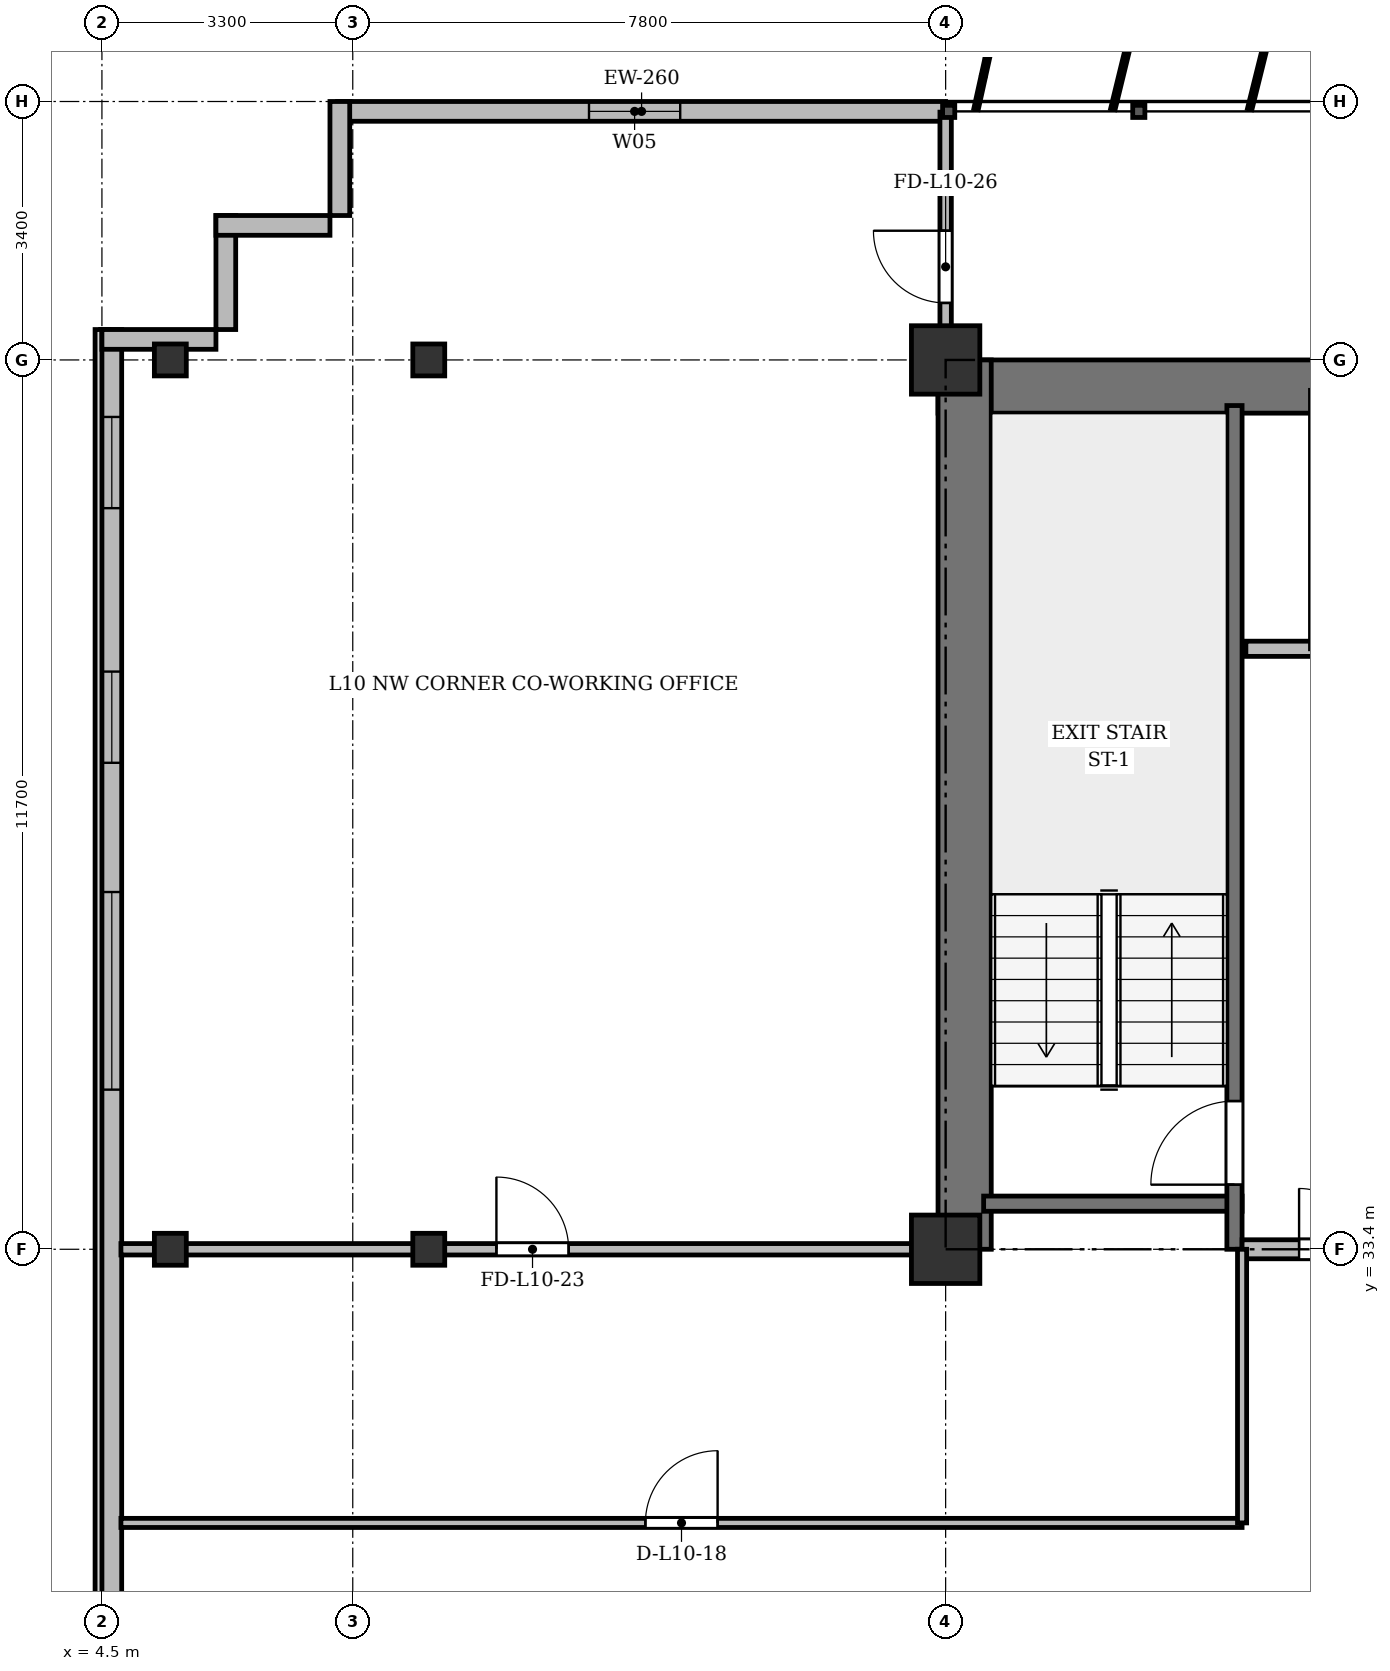
"""IFC4 building model, lengths in metres.
Left out: names, types, materials, properties, quantities, classifications, styles, units other than length and angle.
Written with IfcOpenShell. Run it as: python <this file> out.ifc"""

import sys

from ifc_helpers import new_model, si_unit, direction, frame, frame_2d, origin, origin_2d, place, context, subcontext, project, spatial, rectangle, i_section, extrude, source, transform, mapped, element, fill, save


model = new_model("IFC4")
c1 = context("Model", 3, precision=1e-05, world=origin(), true_north=direction((0.0, 1.0)))
c2 = subcontext(c1, "Body", "Model", "MODEL_VIEW")
j1 = project(units=[si_unit("LENGTHUNIT", "METRE"), si_unit("PLANEANGLEUNIT", "RADIAN")], contexts=[c1])
p1 = place(None, origin())
s1 = spatial("IfcSite", under=j1, at=p1, CompositionType="ELEMENT")
p2 = place(p1, origin())
s2 = spatial("IfcBuilding", under=s1, at=p2, CompositionType="ELEMENT")
p3 = place(p2, frame((0.0, 0.0, 41.5)))
s3 = spatial("IfcBuildingStorey", under=s2, at=p3, CompositionType="ELEMENT", Elevation=41.5)
m1 = source(origin(), c2, "Body", "SweptSolid", [
    extrude(i_section(OverallWidth=0.42, OverallDepth=0.42, WebThickness=0.026, FlangeThickness=0.04, at=origin_2d()), origin(), (0.0, 0.0, 1.0), 3.6),
])
for number, where, z_axis, x_axis in (
    (1, (5.4, 33.4, 0.0), (0.0, 0.0, 1.0), (1.0, 0.0, 0.0)),
    (2, (5.4, 45.1, 0.0), (0.0, 0.0, 1.0), (1.0, 0.0, 0.0)),
    (3, (8.8, 33.4, 0.0), (0.0, 0.0, 1.0), (1.0, 0.0, 0.0)),
    (4, (8.8, 45.1, 0.0), (0.0, 0.0, 1.0), (1.0, 0.0, 0.0)),
):
    element("IfcColumn", number, at=place(p3, frame(where, z_axis=z_axis, x_axis=x_axis)), inside=s3, PredefinedType="COLUMN", context=c2, shape_type="MappedRepresentation", body=[
        mapped(m1, transform((0.0, 0.0, 0.0), x_axis=(1.0, 0.0, 0.0), y_axis=(0.0, 1.0, 0.0), z_axis=(0.0, 0.0, 1.0), scale=1.0)),
    ])
m2 = source(origin(), c2, "Body", "SweptSolid", [
    extrude(rectangle(XDim=0.9, YDim=0.9, at=origin_2d()), origin(), (0.0, 0.0, 1.0), 3.6),
])
for number, where, z_axis, x_axis in (
    (5, (15.6, 33.4, 0.0), (0.0, 0.0, 1.0), (1.0, 0.0, 0.0)),
    (6, (15.6, 45.1, 0.0), (0.0, 0.0, 1.0), (1.0, 0.0, 0.0)),
):
    element("IfcColumn", number, at=place(p3, frame(where, z_axis=z_axis, x_axis=x_axis)), inside=s3, PredefinedType="COLUMN", context=c2, shape_type="MappedRepresentation", body=[
        mapped(m2, transform((0.0, 0.0, 0.0), x_axis=(1.0, 0.0, 0.0), y_axis=(0.0, 1.0, 0.0), z_axis=(0.0, 0.0, 1.0), scale=1.0)),
    ])
p4 = place(p3, frame((7.6, 48.37, 0.0), z_axis=(0.0, 0.0, 1.0), x_axis=(1.0, 0.0, 0.0)))
e7 = element("IfcWall", 7, at=p4, inside=s3, PredefinedType="SOLIDWALL", context=c2, shape_type="SweptSolid", body=[
    extrude(rectangle(XDim=8.0, YDim=0.26, at=frame_2d((4.0, 0.0))), origin(), (0.0, 0.0, 1.0), 3.34),
])
p5 = place(p4, frame((3.308, 0.0, 0.9)))
e8 = element("IfcOpeningElement", 8, at=p5, cuts=e7, PredefinedType="OPENING", context=c2, shape_type="SweptSolid", body=[
    extrude(rectangle(XDim=1.2, YDim=1.65, at=frame_2d((0.6, 0.825))), frame((0.0, 0.14, 0.0), z_axis=(0.0, -1.0, 0.0), x_axis=(1.0, 0.0, 0.0)), (0.0, 0.0, 1.0), 0.28),
])
p6 = place(p3, frame((4.63, 5.9, 0.0), z_axis=(0.0, 0.0, 1.0), x_axis=(0.0, 1.0, 0.0)))
e9 = element("IfcWall", 9, at=p6, inside=s3, PredefinedType="SOLIDWALL", context=c2, shape_type="SweptSolid", body=[
    extrude(rectangle(XDim=39.6, YDim=0.26, at=frame_2d((19.8, 0.0))), origin(), (0.0, 0.0, 1.0), 3.34),
])
p7 = place(p6, frame((1.45, 0.0, 0.92)))
e10 = element("IfcOpeningElement", 10, at=p7, cuts=e9, PredefinedType="OPENING", context=c2, shape_type="SweptSolid", body=[
    extrude(rectangle(XDim=1.2, YDim=1.65, at=frame_2d((0.6, 0.825))), frame((0.0, 0.14, 0.0), z_axis=(0.0, -1.0, 0.0), x_axis=(1.0, 0.0, 0.0)), (0.0, 0.0, 1.0), 0.28),
])
p8 = place(p6, frame((4.2, 0.0, 0.92)))
e11 = element("IfcOpeningElement", 11, at=p8, cuts=e9, PredefinedType="OPENING", context=c2, shape_type="SweptSolid", body=[
    extrude(rectangle(XDim=2.6, YDim=1.9, at=frame_2d((1.3, 0.95))), frame((0.0, 0.14, 0.0), z_axis=(0.0, -1.0, 0.0), x_axis=(1.0, 0.0, 0.0)), (0.0, 0.0, 1.0), 0.28),
])
p9 = place(p6, frame((15.6, 0.0, 0.92)))
e12 = element("IfcOpeningElement", 12, at=p9, cuts=e9, PredefinedType="OPENING", context=c2, shape_type="SweptSolid", body=[
    extrude(rectangle(XDim=2.6, YDim=1.9, at=frame_2d((1.3, 0.95))), frame((0.0, 0.14, 0.0), z_axis=(0.0, -1.0, 0.0), x_axis=(1.0, 0.0, 0.0)), (0.0, 0.0, 1.0), 0.28),
])
p10 = place(p6, frame((29.6, 0.0, 0.92)))
e13 = element("IfcOpeningElement", 13, at=p10, cuts=e9, PredefinedType="OPENING", context=c2, shape_type="SweptSolid", body=[
    extrude(rectangle(XDim=2.6, YDim=1.9, at=frame_2d((1.3, 0.95))), frame((0.0, 0.14, 0.0), z_axis=(0.0, -1.0, 0.0), x_axis=(1.0, 0.0, 0.0)), (0.0, 0.0, 1.0), 0.28),
])
p11 = place(p6, frame((33.9, 0.0, 0.92)))
e14 = element("IfcOpeningElement", 14, at=p11, cuts=e9, PredefinedType="OPENING", context=c2, shape_type="SweptSolid", body=[
    extrude(rectangle(XDim=1.2, YDim=1.65, at=frame_2d((0.6, 0.825))), frame((0.0, 0.14, 0.0), z_axis=(0.0, -1.0, 0.0), x_axis=(1.0, 0.0, 0.0)), (0.0, 0.0, 1.0), 0.28),
])
p12 = place(p6, frame((37.25, 0.0, 0.92)))
e15 = element("IfcOpeningElement", 15, at=p12, cuts=e9, PredefinedType="OPENING", context=c2, shape_type="SweptSolid", body=[
    extrude(rectangle(XDim=1.2, YDim=1.65, at=frame_2d((0.6, 0.825))), frame((0.0, 0.14, 0.0), z_axis=(0.0, -1.0, 0.0), x_axis=(1.0, 0.0, 0.0)), (0.0, 0.0, 1.0), 0.28),
])
p13 = place(p3, frame((4.5, 45.37, 0.0), z_axis=(0.0, 0.0, 1.0), x_axis=(1.0, 0.0, 0.0)))
e16 = element("IfcWall", 16, at=p13, inside=s3, PredefinedType="SOLIDWALL", context=c2, shape_type="SweptSolid", body=[
    extrude(rectangle(XDim=1.5, YDim=0.26, at=frame_2d((0.75, 0.0))), origin(), (0.0, 0.0, 1.0), 2.69),
])
for number, where, z_axis, x_axis in (
    (17, (6.13, 45.5, 0.0), (0.0, 0.0, 1.0), (0.0, 1.0, 0.0)),
    (18, (6.0, 46.87, 0.0), (0.0, 0.0, 1.0), (1.0, 0.0, 0.0)),
    (19, (7.63, 47.0, 0.0), (0.0, 0.0, 1.0), (0.0, 1.0, 0.0)),
):
    element("IfcWall", number, at=place(p3, frame(where, z_axis=z_axis, x_axis=x_axis)), inside=s3, PredefinedType="SOLIDWALL", context=c2, shape_type="SweptSolid", body=[
        extrude(rectangle(XDim=1.5, YDim=0.26, at=frame_2d((0.75, 0.0))), origin(), (0.0, 0.0, 1.0), 3.34),
    ])
p14 = place(p3, frame((15.5, 44.75, 0.0), z_axis=(0.0, 0.0, 1.0), x_axis=(1.0, 0.0, 0.0)))
e20 = element("IfcWall", 20, at=p14, inside=s3, PredefinedType="SHEAR", context=c2, shape_type="SweptSolid", body=[
    extrude(rectangle(XDim=43.4, YDim=0.7, at=frame_2d((21.7, 0.0))), origin(), (0.0, 0.0, 1.0), 3.34),
])
p15 = place(p3, frame((15.85, 33.4, 0.0), z_axis=(0.0, 0.0, 1.0), x_axis=(0.0, 1.0, 0.0)))
e21 = element("IfcWall", 21, at=p15, inside=s3, PredefinedType="SHEAR", context=c2, shape_type="SweptSolid", body=[
    extrude(rectangle(XDim=11.7, YDim=0.7, at=frame_2d((5.85, 0.0))), origin(), (0.0, 0.0, 1.0), 3.34),
])
p16 = place(p3, frame((16.1, 34.0, 0.0), z_axis=(0.0, 0.0, 1.0), x_axis=(1.0, 0.0, 0.0)))
e22 = element("IfcWall", 22, at=p16, inside=s3, PredefinedType="SHEAR", context=c2, shape_type="SweptSolid", body=[
    extrude(rectangle(XDim=3.4, YDim=0.2, at=frame_2d((1.7, 0.0))), origin(), (0.0, 0.0, 1.0), 3.34),
])
p17 = place(p3, frame((19.4, 33.4, 0.0), z_axis=(0.0, 0.0, 1.0), x_axis=(0.0, 1.0, 0.0)))
e23 = element("IfcWall", 23, at=p17, inside=s3, PredefinedType="SHEAR", context=c2, shape_type="SweptSolid", body=[
    extrude(rectangle(XDim=11.1, YDim=0.2, at=frame_2d((5.55, 0.0))), origin(), (0.0, 0.0, 1.0), 3.34),
])
p18 = place(p17, frame((0.85, 0.0, 0.0)))
e24 = element("IfcOpeningElement", 24, at=p18, cuts=e23, PredefinedType="OPENING", context=c2, shape_type="SweptSolid", body=[
    extrude(rectangle(XDim=1.1, YDim=2.15, at=frame_2d((0.55, 1.075))), frame((0.0, 0.11, 0.0), z_axis=(0.0, -1.0, 0.0), x_axis=(1.0, 0.0, 0.0)), (0.0, 0.0, 1.0), 0.22),
])
p19 = place(p3, frame((19.55, 41.3, 0.0), z_axis=(0.0, 0.0, 1.0), x_axis=(1.0, 0.0, 0.0)))
e25 = element("IfcWall", 25, at=p19, inside=s3, PredefinedType="SOLIDWALL", context=c2, shape_type="SweptSolid", body=[
    extrude(rectangle(XDim=6.75, YDim=0.2, at=frame_2d((3.375, 0.0))), origin(), (0.0, 0.0, 1.0), 3.34),
])
p20 = place(p19, frame((1.7, 0.0, 0.0)))
e26 = element("IfcOpeningElement", 26, at=p20, cuts=e25, PredefinedType="OPENING", context=c2, shape_type="SweptSolid", body=[
    extrude(rectangle(XDim=1.1, YDim=2.15, at=frame_2d((0.55, 1.075))), frame((0.0, 0.11, 0.0), z_axis=(0.0, -1.0, 0.0), x_axis=(1.0, 0.0, 0.0)), (0.0, 0.0, 1.0), 0.22),
])
p21 = place(p19, frame((4.4, 0.0, 0.0)))
e27 = element("IfcOpeningElement", 27, at=p21, cuts=e25, PredefinedType="OPENING", context=c2, shape_type="SweptSolid", body=[
    extrude(rectangle(XDim=1.1, YDim=2.15, at=frame_2d((0.55, 1.075))), frame((0.0, 0.11, 0.0), z_axis=(0.0, -1.0, 0.0), x_axis=(1.0, 0.0, 0.0)), (0.0, 0.0, 1.0), 0.22),
])
p22 = place(p3, frame((19.5, 33.4, 0.0), z_axis=(0.0, 0.0, 1.0), x_axis=(1.0, 0.0, 0.0)))
e28 = element("IfcWall", 28, at=p22, inside=s3, PredefinedType="PARTITIONING", context=c2, shape_type="SweptSolid", body=[
    extrude(rectangle(XDim=6.8, YDim=0.25, at=frame_2d((3.4, 0.0))), origin(), (0.0, 0.0, 1.0), 2.69),
])
p23 = place(p22, frame((0.75, 0.0, 0.0)))
e29 = element("IfcOpeningElement", 29, at=p23, cuts=e28, PredefinedType="OPENING", context=c2, shape_type="SweptSolid", body=[
    extrude(rectangle(XDim=1.6, YDim=2.2, at=frame_2d((0.8, 1.1))), frame((0.0, 0.135, 0.0), z_axis=(0.0, -1.0, 0.0), x_axis=(1.0, 0.0, 0.0)), (0.0, 0.0, 1.0), 0.27),
])
p24 = place(p3, frame((4.75, 29.8, 0.0), z_axis=(0.0, 0.0, 1.0), x_axis=(1.0, 0.0, 0.0)))
e30 = element("IfcWall", 30, at=p24, inside=s3, PredefinedType="PARTITIONING", context=c2, shape_type="SweptSolid", body=[
    extrude(rectangle(XDim=14.75, YDim=0.12, at=frame_2d((7.375, 0.0))), origin(), (0.0, 0.0, 1.0), 2.752),
])
p25 = place(p24, frame((6.9, 0.0, 0.0)))
e31 = element("IfcOpeningElement", 31, at=p25, cuts=e30, PredefinedType="OPENING", context=c2, shape_type="SweptSolid", body=[
    extrude(rectangle(XDim=0.95, YDim=2.15, at=frame_2d((0.475, 1.075))), frame((0.0, 0.07, 0.0), z_axis=(0.0, -1.0, 0.0), x_axis=(1.0, 0.0, 0.0)), (0.0, 0.0, 1.0), 0.14),
])
p26 = place(p3, frame((19.5, 29.8, 0.0), z_axis=(0.0, 0.0, 1.0), x_axis=(0.0, 1.0, 0.0)))
e32 = element("IfcWall", 32, at=p26, inside=s3, PredefinedType="PARTITIONING", context=c2, shape_type="SweptSolid", body=[
    extrude(rectangle(XDim=3.6, YDim=0.12, at=frame_2d((1.8, 0.0))), origin(), (0.0, 0.0, 1.0), 2.69),
])
p27 = place(p3, frame((4.75, 33.4, 0.0), z_axis=(0.0, 0.0, 1.0), x_axis=(1.0, 0.0, 0.0)))
e33 = element("IfcWall", 33, at=p27, inside=s3, PredefinedType="PARTITIONING", context=c2, shape_type="SweptSolid", body=[
    extrude(rectangle(XDim=10.85, YDim=0.15, at=frame_2d((5.425, 0.0))), origin(), (0.0, 0.0, 1.0), 2.69),
])
p28 = place(p27, frame((4.94, 0.0, 0.0)))
e34 = element("IfcOpeningElement", 34, at=p28, cuts=e33, PredefinedType="OPENING", context=c2, shape_type="SweptSolid", body=[
    extrude(rectangle(XDim=0.95, YDim=2.15, at=frame_2d((0.475, 1.075))), frame((0.0, 0.085, 0.0), z_axis=(0.0, -1.0, 0.0), x_axis=(1.0, 0.0, 0.0)), (0.0, 0.0, 1.0), 0.17),
])
p29 = place(p3, frame((15.6, 44.75, 0.0), z_axis=(0.0, 0.0, 1.0), x_axis=(0.0, 1.0, 0.0)))
e35 = element("IfcWall", 35, at=p29, inside=s3, PredefinedType="PARTITIONING", context=c2, shape_type="SweptSolid", body=[
    extrude(rectangle(XDim=3.61, YDim=0.15, at=frame_2d((1.805, 0.0))), origin(), (0.0, 0.0, 1.0), 2.752),
])
p30 = place(p29, frame((1.1, 0.0, 0.0)))
e36 = element("IfcOpeningElement", 36, at=p30, cuts=e35, PredefinedType="OPENING", context=c2, shape_type="SweptSolid", body=[
    extrude(rectangle(XDim=0.95, YDim=2.15, at=frame_2d((0.475, 1.075))), frame((0.0, 0.085, 0.0), z_axis=(0.0, -1.0, 0.0), x_axis=(1.0, 0.0, 0.0)), (0.0, 0.0, 1.0), 0.17),
])
m3 = source(origin(), c2, "Body", "SweptSolid", [
    extrude(rectangle(XDim=1.2, YDim=1.65, at=frame_2d((0.6, 0.825))), frame((0.0, 0.03, 0.0), z_axis=(0.0, -1.0, 0.0), x_axis=(1.0, 0.0, 0.0)), (0.0, 0.0, 1.0), 0.06),
])
p31 = place(p5, origin())
e37 = element("IfcWindow", 37, at=p31, inside=s3, PartitioningType="SINGLE_PANEL", PredefinedType="WINDOW", context=c2, shape_type="MappedRepresentation", body=[
    mapped(m3, transform((0.0, 0.0, 0.0), x_axis=(1.0, 0.0, 0.0), y_axis=(0.0, 1.0, 0.0), z_axis=(0.0, 0.0, 1.0), scale=1.0)),
])
fill(e8, e37)
m4 = source(origin(), c2, "Body", "SweptSolid", [
    extrude(rectangle(XDim=2.6, YDim=1.9, at=frame_2d((1.3, 0.95))), frame((0.0, 0.03, 0.0), z_axis=(0.0, -1.0, 0.0), x_axis=(1.0, 0.0, 0.0)), (0.0, 0.0, 1.0), 0.06),
])
p32 = place(p10, origin())
e38 = element("IfcWindow", 38, at=p32, inside=s3, PartitioningType="SINGLE_PANEL", PredefinedType="WINDOW", context=c2, shape_type="MappedRepresentation", body=[
    mapped(m4, transform((0.0, 0.0, 0.0), x_axis=(1.0, 0.0, 0.0), y_axis=(0.0, 1.0, 0.0), z_axis=(0.0, 0.0, 1.0), scale=1.0)),
])
fill(e13, e38)
p33 = place(p11, origin())
e39 = element("IfcWindow", 39, at=p33, inside=s3, PartitioningType="SINGLE_PANEL", PredefinedType="WINDOW", context=c2, shape_type="MappedRepresentation", body=[
    mapped(m3, transform((0.0, 0.0, 0.0), x_axis=(1.0, 0.0, 0.0), y_axis=(0.0, 1.0, 0.0), z_axis=(0.0, 0.0, 1.0), scale=1.0)),
])
fill(e14, e39)
p34 = place(p12, origin())
e40 = element("IfcWindow", 40, at=p34, inside=s3, PartitioningType="SINGLE_PANEL", PredefinedType="WINDOW", context=c2, shape_type="MappedRepresentation", body=[
    mapped(m3, transform((0.0, 0.0, 0.0), x_axis=(1.0, 0.0, 0.0), y_axis=(0.0, 1.0, 0.0), z_axis=(0.0, 0.0, 1.0), scale=1.0)),
])
fill(e15, e40)
m5 = source(origin(), c2, "Body", "SweptSolid", [
    extrude(rectangle(XDim=1.1, YDim=2.15, at=frame_2d((0.55, 1.075))), frame((0.0, 0.025, 0.0), z_axis=(0.0, -1.0, 0.0), x_axis=(1.0, 0.0, 0.0)), (0.0, 0.0, 1.0), 0.05),
])
p35 = place(p18, origin())
e41 = element("IfcDoor", 41, at=p35, inside=s3, OperationType="SINGLE_SWING_LEFT", PredefinedType="DOOR", context=c2, shape_type="MappedRepresentation", body=[
    mapped(m5, transform((0.0, 0.0, 0.0), x_axis=(1.0, 0.0, 0.0), y_axis=(0.0, 1.0, 0.0), z_axis=(0.0, 0.0, 1.0), scale=1.0)),
])
fill(e24, e41)
m6 = source(origin(), c2, "Body", "SweptSolid", [
    extrude(rectangle(XDim=1.6, YDim=2.2, at=frame_2d((0.8, 1.1))), frame((0.0, 0.025, 0.0), z_axis=(0.0, -1.0, 0.0), x_axis=(1.0, 0.0, 0.0)), (0.0, 0.0, 1.0), 0.05),
])
p36 = place(p23, origin())
e42 = element("IfcDoor", 42, at=p36, inside=s3, OperationType="DOUBLE_DOOR_SINGLE_SWING", PredefinedType="DOOR", context=c2, shape_type="MappedRepresentation", body=[
    mapped(m6, transform((0.0, 0.0, 0.0), x_axis=(1.0, 0.0, 0.0), y_axis=(0.0, 1.0, 0.0), z_axis=(0.0, 0.0, 1.0), scale=1.0)),
])
fill(e29, e42)
m7 = source(origin(), c2, "Body", "SweptSolid", [
    extrude(rectangle(XDim=0.95, YDim=2.15, at=frame_2d((0.475, 1.075))), frame((0.0, 0.025, 0.0), z_axis=(0.0, -1.0, 0.0), x_axis=(1.0, 0.0, 0.0)), (0.0, 0.0, 1.0), 0.05),
])
p37 = place(p25, origin())
e43 = element("IfcDoor", 43, at=p37, inside=s3, OperationType="SINGLE_SWING_RIGHT", PredefinedType="DOOR", context=c2, shape_type="MappedRepresentation", body=[
    mapped(m7, transform((0.0, 0.0, 0.0), x_axis=(1.0, 0.0, 0.0), y_axis=(0.0, 1.0, 0.0), z_axis=(0.0, 0.0, 1.0), scale=1.0)),
])
fill(e31, e43)
p38 = place(p28, origin())
e44 = element("IfcDoor", 44, at=p38, inside=s3, OperationType="SINGLE_SWING_LEFT", PredefinedType="DOOR", context=c2, shape_type="MappedRepresentation", body=[
    mapped(m7, transform((0.0, 0.0, 0.0), x_axis=(1.0, 0.0, 0.0), y_axis=(0.0, 1.0, 0.0), z_axis=(0.0, 0.0, 1.0), scale=1.0)),
])
fill(e34, e44)
p39 = place(p30, origin())
e45 = element("IfcDoor", 45, at=p39, inside=s3, OperationType="SINGLE_SWING_RIGHT", PredefinedType="DOOR", context=c2, shape_type="MappedRepresentation", body=[
    mapped(m7, transform((0.0, 0.0, 0.0), x_axis=(1.0, 0.0, 0.0), y_axis=(0.0, 1.0, 0.0), z_axis=(0.0, 0.0, 1.0), scale=1.0)),
])
fill(e36, e45)
save(model, sys.argv[1])
